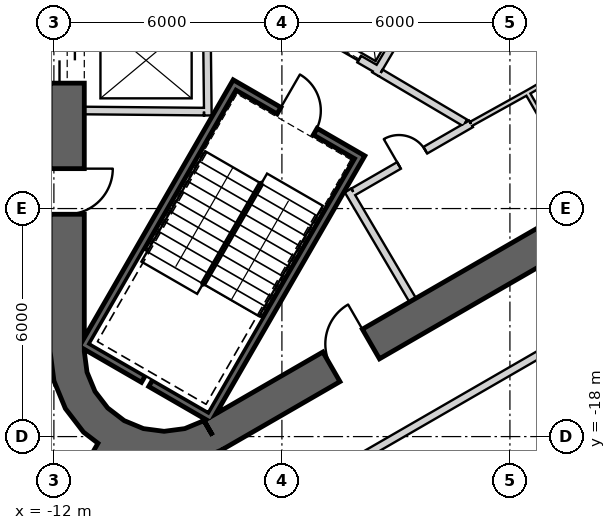
"""IFC4 building model, lengths in metres.
Left out: names, types, materials, properties, quantities, classifications, styles, units other than length and angle.
Written with IfcOpenShell. Run it as: python <this file> out.ifc"""

import sys

from ifc_helpers import new_model, si_unit, direction, frame, frame_2d, origin, place, context, subcontext, project, spatial, polyline, rectangle, outline, extrude, element, fill, save


model = new_model("IFC4")
c1 = context("Model", 3, precision=1e-05, world=origin(), true_north=direction((0.0, 1.0)))
c2 = subcontext(c1, "Body", "Model", "MODEL_VIEW")
j1 = project(units=[si_unit("LENGTHUNIT", "METRE"), si_unit("PLANEANGLEUNIT", "RADIAN")], contexts=[c1])
p1 = place(None, origin())
s1 = spatial("IfcSite", under=j1, at=p1, CompositionType="ELEMENT")
p2 = place(p1, origin())
s2 = spatial("IfcBuilding", under=s1, at=p2, CompositionType="ELEMENT")
p3 = place(p2, frame((0.0, 0.0, 380.6)))
s3 = spatial("IfcBuildingStorey", under=s2, at=p3, CompositionType="ELEMENT", Elevation=380.6)
p4 = place(p3, frame((-11.65, 15.762, 0.0), z_axis=(0.0, 0.0, 1.0), x_axis=(0.0, -1.0, 0.0)))
e1 = element("IfcWall", 1, at=p4, inside=s3, PredefinedType="SHEAR", context=c2, shape_type="SweptSolid", body=[
    extrude(rectangle(XDim=31.523, YDim=0.9, at=frame_2d((15.762, 0.0))), origin(), (0.0, 0.0, 1.0), 3.9),
])
p5 = place(p4, frame((7.062, 0.0, 0.0)))
e2 = element("IfcOpeningElement", 2, at=p5, cuts=e1, PredefinedType="OPENING", context=c2, shape_type="SweptSolid", body=[
    extrude(rectangle(XDim=1.2, YDim=2.4, at=frame_2d((0.6, 1.2))), frame((0.0, 0.46, 0.0), z_axis=(0.0, -1.0, 0.0), x_axis=(1.0, 0.0, 0.0)), (0.0, 0.0, 1.0), 0.92),
])
p6 = place(p4, frame((9.762, 0.0, 0.0)))
e3 = element("IfcOpeningElement", 3, at=p6, cuts=e1, PredefinedType="OPENING", context=c2, shape_type="SweptSolid", body=[
    extrude(rectangle(XDim=1.2, YDim=2.4, at=frame_2d((0.6, 1.2))), frame((0.0, 0.46, 0.0), z_axis=(0.0, -1.0, 0.0), x_axis=(1.0, 0.0, 0.0)), (0.0, 0.0, 1.0), 0.92),
])
p7 = place(p4, frame((12.462, 0.0, 0.0)))
e4 = element("IfcOpeningElement", 4, at=p7, cuts=e1, PredefinedType="OPENING", context=c2, shape_type="SweptSolid", body=[
    extrude(rectangle(XDim=1.2, YDim=2.4, at=frame_2d((0.6, 1.2))), frame((0.0, 0.46, 0.0), z_axis=(0.0, -1.0, 0.0), x_axis=(1.0, 0.0, 0.0)), (0.0, 0.0, 1.0), 0.92),
])
p8 = place(p4, frame((15.162, 0.0, 0.0)))
e5 = element("IfcOpeningElement", 5, at=p8, cuts=e1, PredefinedType="OPENING", context=c2, shape_type="SweptSolid", body=[
    extrude(rectangle(XDim=1.2, YDim=2.4, at=frame_2d((0.6, 1.2))), frame((0.0, 0.46, 0.0), z_axis=(0.0, -1.0, 0.0), x_axis=(1.0, 0.0, 0.0)), (0.0, 0.0, 1.0), 0.92),
])
p9 = place(p4, frame((17.862, 0.0, 0.0)))
e6 = element("IfcOpeningElement", 6, at=p9, cuts=e1, PredefinedType="OPENING", context=c2, shape_type="SweptSolid", body=[
    extrude(rectangle(XDim=1.2, YDim=2.4, at=frame_2d((0.6, 1.2))), frame((0.0, 0.46, 0.0), z_axis=(0.0, -1.0, 0.0), x_axis=(1.0, 0.0, 0.0)), (0.0, 0.0, 1.0), 0.92),
])
p10 = place(p4, frame((20.562, 0.0, 0.0)))
e7 = element("IfcOpeningElement", 7, at=p10, cuts=e1, PredefinedType="OPENING", context=c2, shape_type="SweptSolid", body=[
    extrude(rectangle(XDim=1.2, YDim=2.4, at=frame_2d((0.6, 1.2))), frame((0.0, 0.46, 0.0), z_axis=(0.0, -1.0, 0.0), x_axis=(1.0, 0.0, 0.0)), (0.0, 0.0, 1.0), 0.92),
])
p11 = place(p4, frame((23.262, 0.0, 0.0)))
e8 = element("IfcOpeningElement", 8, at=p11, cuts=e1, PredefinedType="OPENING", context=c2, shape_type="SweptSolid", body=[
    extrude(rectangle(XDim=1.2, YDim=2.4, at=frame_2d((0.6, 1.2))), frame((0.0, 0.46, 0.0), z_axis=(0.0, -1.0, 0.0), x_axis=(1.0, 0.0, 0.0)), (0.0, 0.0, 1.0), 0.92),
])
p12 = place(p4, frame((3.612, 0.0, 0.0)))
e9 = element("IfcOpeningElement", 9, at=p12, cuts=e1, PredefinedType="OPENING", context=c2, shape_type="SweptSolid", body=[
    extrude(rectangle(XDim=1.2, YDim=2.4, at=frame_2d((0.6, 1.2))), frame((0.0, 0.46, 0.0), z_axis=(0.0, -1.0, 0.0), x_axis=(1.0, 0.0, 0.0)), (0.0, 0.0, 1.0), 0.92),
])
p13 = place(p4, frame((26.712, 0.0, 0.0)))
e10 = element("IfcOpeningElement", 10, at=p13, cuts=e1, PredefinedType="OPENING", context=c2, shape_type="SweptSolid", body=[
    extrude(rectangle(XDim=1.2, YDim=2.4, at=frame_2d((0.6, 1.2))), frame((0.0, 0.46, 0.0), z_axis=(0.0, -1.0, 0.0), x_axis=(1.0, 0.0, 0.0)), (0.0, 0.0, 1.0), 0.92),
])
p14 = place(p3, frame((-7.825, -17.97, 0.0), z_axis=(0.0, 0.0, 1.0), x_axis=(0.866028369851, 0.499994862586, 0.0)))
e11 = element("IfcWall", 11, at=p14, inside=s3, PredefinedType="SHEAR", context=c2, shape_type="SweptSolid", body=[
    extrude(rectangle(XDim=31.523, YDim=0.9, at=frame_2d((15.762, 0.0))), origin(), (0.0, 0.0, 1.0), 3.9),
])
p15 = place(p14, frame((17.862, 0.0, 0.0)))
e12 = element("IfcOpeningElement", 12, at=p15, cuts=e11, PredefinedType="OPENING", context=c2, shape_type="SweptSolid", body=[
    extrude(rectangle(XDim=1.2, YDim=2.4, at=frame_2d((0.6, 1.2))), frame((0.0, 0.46, 0.0), z_axis=(0.0, -1.0, 0.0), x_axis=(1.0, 0.0, 0.0)), (0.0, 0.0, 1.0), 0.92),
])
p16 = place(p14, frame((20.562, 0.0, 0.0)))
e13 = element("IfcOpeningElement", 13, at=p16, cuts=e11, PredefinedType="OPENING", context=c2, shape_type="SweptSolid", body=[
    extrude(rectangle(XDim=1.2, YDim=2.4, at=frame_2d((0.6, 1.2))), frame((0.0, 0.46, 0.0), z_axis=(0.0, -1.0, 0.0), x_axis=(1.0, 0.0, 0.0)), (0.0, 0.0, 1.0), 0.92),
])
p17 = place(p14, frame((26.712, 0.0, 0.0)))
e14 = element("IfcOpeningElement", 14, at=p17, cuts=e11, PredefinedType="OPENING", context=c2, shape_type="SweptSolid", body=[
    extrude(rectangle(XDim=1.2, YDim=2.4, at=frame_2d((0.6, 1.2))), frame((0.0, 0.46, 0.0), z_axis=(0.0, -1.0, 0.0), x_axis=(1.0, 0.0, 0.0)), (0.0, 0.0, 1.0), 0.92),
])
p18 = place(p14, frame((3.612, 0.0, 0.0)))
e15 = element("IfcOpeningElement", 15, at=p18, cuts=e11, PredefinedType="OPENING", context=c2, shape_type="SweptSolid", body=[
    extrude(rectangle(XDim=1.2, YDim=2.4, at=frame_2d((0.6, 1.2))), frame((0.0, 0.46, 0.0), z_axis=(0.0, -1.0, 0.0), x_axis=(1.0, 0.0, 0.0)), (0.0, 0.0, 1.0), 0.92),
])
p19 = place(p3, origin())
e16 = element("IfcWall", 16, at=p19, inside=s3, PredefinedType="SHEAR", context=c2, shape_type="SweptSolid", body=[
    extrude(outline(polyline([(-12.1, -15.762), (-11.998, -16.538), (-11.698, -17.262), (-11.221, -17.883), (-10.6, -18.36), (-9.876, -18.659), (-9.1, -18.762), (-8.323, -18.659), (-7.6, -18.36), (-8.05, -17.58), (-8.556, -17.79), (-9.1, -17.862), (-9.644, -17.79), (-10.15, -17.58), (-10.585, -17.247), (-10.919, -16.812), (-11.128, -16.305), (-11.2, -15.762), (-12.1, -15.762)])), origin(), (0.0, 0.0, 1.0), 3.9),
])
p20 = place(p3, frame((-10.575, -18.316, 0.0), z_axis=(0.0, 0.0, 1.0), x_axis=(-0.500011655475, -0.866018674388, 0.0)))
e17 = element("IfcWall", 17, at=p20, inside=s3, PredefinedType="SHEAR", context=c2, shape_type="SweptSolid", body=[
    extrude(rectangle(XDim=6.455, YDim=0.6, at=frame_2d((3.228, 0.0))), origin(), (0.0, 0.0, 1.0), 3.9),
])
p21 = place(p20, frame((2.35, 0.0, 0.0)))
e18 = element("IfcOpeningElement", 18, at=p21, cuts=e17, PredefinedType="OPENING", context=c2, shape_type="SweptSolid", body=[
    extrude(rectangle(XDim=1.4, YDim=2.4, at=frame_2d((0.7, 1.2))), frame((0.0, 0.31, 0.0), z_axis=(0.0, -1.0, 0.0), x_axis=(1.0, 0.0, 0.0)), (0.0, 0.0, 1.0), 0.62),
])
p22 = place(p3, frame((-7.979, -6.85, 0.0), z_axis=(0.0, 0.0, 1.0), x_axis=(0.011121475088, -0.999938154483, 0.0)))
e19 = element("IfcWall", 19, at=p22, inside=s3, PredefinedType="PLUMBINGWALL", context=c2, shape_type="SweptSolid", body=[
    extrude(rectangle(XDim=2.7, YDim=0.2, at=frame_2d((1.35, 0.0))), origin(), (0.0, 0.0, 1.0), 3.6),
])
p23 = place(p3, frame((-8.05, -9.449, 0.0), z_axis=(0.0, 0.0, 1.0), x_axis=(-0.999957467379, 0.009222983926, 0.0)))
e20 = element("IfcWall", 20, at=p23, inside=s3, PredefinedType="PLUMBINGWALL", context=c2, shape_type="SweptSolid", body=[
    extrude(rectangle(XDim=3.15, YDim=0.2, at=frame_2d((1.575, 0.0))), origin(), (0.0, 0.0, 1.0), 3.6),
])
p24 = place(p3, frame((-3.905, -10.563, -0.3), z_axis=(0.0, 0.0, 1.0), x_axis=(-0.500012932018, -0.866017937352, 0.0)))
e21 = element("IfcWall", 21, at=p24, inside=s3, PredefinedType="SHEAR", context=c2, shape_type="SweptSolid", body=[
    extrude(rectangle(XDim=8.1, YDim=0.2, at=frame_2d((4.05, 0.0))), origin(), (0.0, 0.0, 1.0), 3.9),
])
p25 = place(p3, frame((-11.282, -15.541, -0.3), z_axis=(0.0, 0.0, 1.0), x_axis=(0.866000578957, -0.500042995397, 0.0)))
e22 = element("IfcWall", 22, at=p25, inside=s3, PredefinedType="SHEAR", context=c2, shape_type="SweptSolid", body=[
    extrude(rectangle(XDim=1.89, YDim=0.2, at=frame_2d((0.945, 0.0))), origin(), (0.0, 0.0, 1.0), 3.9),
])
p26 = place(p3, frame((-9.455, -16.596, -0.3), z_axis=(0.0, 0.0, 1.0), x_axis=(0.866038843867, -0.499976720371, 0.0)))
e23 = element("IfcWall", 23, at=p26, inside=s3, PredefinedType="SHEAR", context=c2, shape_type="SweptSolid", body=[
    extrude(rectangle(XDim=1.69, YDim=0.2, at=frame_2d((0.845, 0.0))), origin(), (0.0, 0.0, 1.0), 3.9),
])
p27 = place(p3, frame((-7.196, -8.663, -0.3), z_axis=(0.0, 0.0, 1.0), x_axis=(-0.499997992926, -0.866026562566, 0.0)))
e24 = element("IfcWall", 24, at=p27, inside=s3, PredefinedType="SHEAR", context=c2, shape_type="SweptSolid", body=[
    extrude(rectangle(XDim=7.9, YDim=0.2, at=frame_2d((3.95, 0.0))), origin(), (0.0, 0.0, 1.0), 3.9),
])
p28 = place(p3, frame((-4.041, -10.599, -0.3), z_axis=(0.0, 0.0, 1.0), x_axis=(-0.866047807691, 0.499961193289, 0.0)))
e25 = element("IfcWall", 25, at=p28, inside=s3, PredefinedType="SHEAR", context=c2, shape_type="SweptSolid", body=[
    extrude(rectangle(XDim=3.6, YDim=0.2, at=frame_2d((1.8, 0.0))), origin(), (0.0, 0.0, 1.0), 3.9),
])
p29 = place(p28, frame((1.25, 0.0, 0.3)))
e26 = element("IfcOpeningElement", 26, at=p29, cuts=e25, PredefinedType="OPENING", context=c2, shape_type="SweptSolid", body=[
    extrude(rectangle(XDim=1.1, YDim=2.1, at=frame_2d((0.55, 1.05))), frame((0.0, 0.11, 0.0), z_axis=(0.0, -1.0, 0.0), x_axis=(1.0, 0.0, 0.0)), (0.0, 0.0, 1.0), 0.22),
])
p30 = place(p3, frame((-3.446, -8.368, 0.0), z_axis=(0.0, 0.0, 1.0), x_axis=(-0.866024647952, 0.500001309137, 0.0)))
e27 = element("IfcWall", 27, at=p30, inside=s3, PredefinedType="PLUMBINGWALL", context=c2, shape_type="SweptSolid", body=[
    extrude(rectangle(XDim=2.4, YDim=0.2, at=frame_2d((1.2, 0.0))), origin(), (0.0, 0.0, 1.0), 3.6),
])
p31 = place(p30, frame((0.6, 0.0, 0.0)))
e28 = element("IfcOpeningElement", 28, at=p31, cuts=e27, PredefinedType="OPENING", context=c2, shape_type="SweptSolid", body=[
    extrude(rectangle(XDim=1.2, YDim=2.4, at=frame_2d((0.6, 1.2))), frame((0.0, 0.11, 0.0), z_axis=(0.0, -1.0, 0.0), x_axis=(1.0, 0.0, 0.0)), (0.0, 0.0, 1.0), 0.22),
])
p32 = place(p3, frame((-2.012, -5.882, 0.0), z_axis=(0.0, 0.0, 1.0), x_axis=(-0.508619639323, -0.860991325447, 0.0)))
e29 = element("IfcWall", 29, at=p32, inside=s3, PredefinedType="PLUMBINGWALL", context=c2, shape_type="SweptSolid", body=[
    extrude(rectangle(XDim=3.0, YDim=0.2, at=frame_2d((1.5, 0.0))), origin(), (0.0, 0.0, 1.0), 3.6),
])
p33 = place(p3, frame((-1.897, -10.275, 0.0), z_axis=(0.0, 0.0, 1.0), x_axis=(0.499984717929, -0.866034226713, 0.0)))
e30 = element("IfcWall", 30, at=p33, inside=s3, PredefinedType="PARTITIONING", context=c2, shape_type="SweptSolid", body=[
    extrude(rectangle(XDim=3.25, YDim=0.12, at=frame_2d((1.625, 0.0))), origin(), (0.0, 0.0, 1.0), 3.6),
])
p34 = place(p3, frame((-4.26, -11.524, 0.0), z_axis=(0.0, 0.0, 1.0), x_axis=(0.507997497166, -0.861358544901, 0.0)))
e31 = element("IfcWall", 31, at=p34, inside=s3, PredefinedType="PARTITIONING", context=c2, shape_type="SweptSolid", body=[
    extrude(rectangle(XDim=3.35, YDim=0.2, at=frame_2d((1.675, 0.0))), origin(), (0.0, 0.0, 1.0), 3.6),
])
p35 = place(p34, frame((1.325, 0.0, 0.0)))
e32 = element("IfcOpeningElement", 32, at=p35, cuts=e31, PredefinedType="OPENING", context=c2, shape_type="SweptSolid", body=[
    extrude(rectangle(XDim=0.8, YDim=2.1, at=frame_2d((0.4, 1.05))), frame((0.0, 0.11, 0.0), z_axis=(0.0, -1.0, 0.0), x_axis=(1.0, 0.0, 0.0)), (0.0, 0.0, 1.0), 0.22),
])
p36 = place(p3, frame((-1.769, -10.237, 0.0), z_axis=(0.0, 0.0, 1.0), x_axis=(-0.871534483978, -0.490334215854, 0.0)))
e33 = element("IfcWall", 33, at=p36, inside=s3, PredefinedType="PARTITIONING", context=c2, shape_type="SweptSolid", body=[
    extrude(rectangle(XDim=2.7, YDim=0.2, at=frame_2d((1.35, 0.0))), origin(), (0.0, 0.0, 1.0), 3.6),
])
p37 = place(p3, frame((-1.024, -9.771, 0.0), z_axis=(0.0, 0.0, 1.0), x_axis=(-0.850348075135, -0.526220629693, 0.0)))
e34 = element("IfcWall", 34, at=p37, inside=s3, PredefinedType="PARTITIONING", context=c2, shape_type="SweptSolid", body=[
    extrude(rectangle(XDim=0.878, YDim=0.2, at=frame_2d((0.439, 0.0))), origin(), (0.0, 0.0, 1.0), 3.6),
])
p38 = place(p3, frame((0.42, -8.938, 0.0), z_axis=(0.0, 0.0, 1.0), x_axis=(0.871409832999, 0.490555708306, 0.0)))
e35 = element("IfcWall", 35, at=p38, inside=s3, PredefinedType="PLUMBINGWALL", context=c2, shape_type="SweptSolid", body=[
    extrude(rectangle(XDim=2.755, YDim=0.15, at=frame_2d((1.377, 0.0))), origin(), (0.0, 0.0, 1.0), 3.6),
])
p39 = place(p3, frame((0.4, -8.949, 0.0), z_axis=(0.0, 0.0, 1.0), x_axis=(-0.866019818373, -0.500009674092, 0.0)))
e36 = element("IfcWall", 36, at=p39, inside=s3, PredefinedType="PARTITIONING", context=c2, shape_type="SweptSolid", body=[
    extrude(rectangle(XDim=1.594, YDim=0.12, at=frame_2d((0.797, 0.0))), origin(), (0.0, 0.0, 1.0), 3.6),
])
p40 = place(p39, frame((0.397, 0.0, 0.0)))
e37 = element("IfcOpeningElement", 37, at=p40, cuts=e36, PredefinedType="OPENING", context=c2, shape_type="SweptSolid", body=[
    extrude(rectangle(XDim=0.8, YDim=2.1, at=frame_2d((0.4, 1.05))), frame((0.0, 0.07, 0.0), z_axis=(0.0, -1.0, 0.0), x_axis=(1.0, 0.0, 0.0)), (0.0, 0.0, 1.0), 0.14),
])
p41 = place(p3, frame((-3.401, -8.43, 0.0), z_axis=(0.0, 0.0, 1.0), x_axis=(0.860617791406, -0.509251428192, 0.0)))
e38 = element("IfcWall", 38, at=p41, inside=s3, PredefinedType="PARTITIONING", context=c2, shape_type="SweptSolid", body=[
    extrude(rectangle(XDim=2.709, YDim=0.2, at=frame_2d((1.354, 0.0))), origin(), (0.0, 0.0, 1.0), 3.6),
])
p42 = place(p41, frame((0.848, 0.0, 0.0)))
e39 = element("IfcOpeningElement", 39, at=p42, cuts=e38, PredefinedType="OPENING", context=c2, shape_type="SweptSolid", body=[
    extrude(rectangle(XDim=1.0, YDim=2.1, at=frame_2d((0.5, 1.05))), frame((0.0, 0.11, 0.0), z_axis=(0.0, -1.0, 0.0), x_axis=(1.0, 0.0, 0.0)), (0.0, 0.0, 1.0), 0.22),
])
p43 = place(p3, frame((-1.477, -7.808, 0.0), z_axis=(0.0, 0.0, 1.0), x_axis=(0.871829948107, -0.48980867855, 0.0)))
e40 = element("IfcWall", 40, at=p43, inside=s3, PredefinedType="PLUMBINGWALL", context=c2, shape_type="SweptSolid", body=[
    extrude(rectangle(XDim=2.152, YDim=0.15, at=frame_2d((1.076, 0.0))), origin(), (0.0, 0.0, 1.0), 3.6),
])
p44 = place(p3, frame((-7.061, -20.358, 0.0), z_axis=(0.0, 0.0, 1.0), x_axis=(0.866024332115, 0.500001856182, 0.0)))
e41 = element("IfcWall", 41, at=p44, inside=s3, PredefinedType="PARTITIONING", context=c2, shape_type="SweptSolid", body=[
    extrude(rectangle(XDim=8.925, YDim=0.2, at=frame_2d((4.463, 0.0))), origin(), (0.0, 0.0, 1.0), 2.97),
])
p45 = place(p44, frame((4.1, 0.0, 0.0)))
e42 = element("IfcOpeningElement", 42, at=p45, cuts=e41, PredefinedType="OPENING", context=c2, shape_type="SweptSolid", body=[
    extrude(rectangle(XDim=1.0, YDim=2.1, at=frame_2d((0.5, 1.05))), frame((0.0, 0.11, 0.0), z_axis=(0.0, -1.0, 0.0), x_axis=(1.0, 0.0, 0.0)), (0.0, 0.0, 1.0), 0.22),
])
p46 = place(p3, frame((0.669, -15.895, 0.0), z_axis=(0.0, 0.0, 1.0), x_axis=(0.866018980909, 0.500011124582, 0.0)))
e43 = element("IfcWall", 43, at=p46, inside=s3, PredefinedType="PARTITIONING", context=c2, shape_type="SweptSolid", body=[
    extrude(rectangle(XDim=6.808, YDim=0.2, at=frame_2d((3.404, 0.0))), origin(), (0.0, 0.0, 1.0), 3.07),
])
p47 = place(p46, frame((3.056, 0.0, 0.0)))
e44 = element("IfcOpeningElement", 44, at=p47, cuts=e43, PredefinedType="OPENING", context=c2, shape_type="SweptSolid", body=[
    extrude(rectangle(XDim=1.0, YDim=2.1, at=frame_2d((0.5, 1.05))), frame((0.0, 0.11, 0.0), z_axis=(0.0, -1.0, 0.0), x_axis=(1.0, 0.0, 0.0)), (0.0, 0.0, 1.0), 0.22),
])
p48 = place(p3, frame((4.688, -21.709, 0.0), z_axis=(0.0, 0.0, 1.0), x_axis=(-0.565900898816, 0.824473269864, 0.0)))
e45 = element("IfcWall", 45, at=p48, inside=s3, PredefinedType="PARTITIONING", context=c2, shape_type="SweptSolid", body=[
    extrude(rectangle(XDim=6.965, YDim=0.2, at=frame_2d((3.483, 0.0))), origin(), (0.0, 0.0, 1.0), 3.07),
])
p49 = place(p29, origin())
e46 = element("IfcDoor", 46, at=p49, inside=s3, OperationType="SINGLE_SWING_RIGHT", PredefinedType="USERDEFINED", context=c2, shape_type="SweptSolid", body=[
    extrude(rectangle(XDim=1.1, YDim=2.1, at=frame_2d((0.55, 1.05))), frame((0.0, 0.025, 0.0), z_axis=(0.0, -1.0, 0.0), x_axis=(1.0, 0.0, 0.0)), (0.0, 0.0, 1.0), 0.05),
])
fill(e26, e46)
p50 = place(p42, origin())
e47 = element("IfcDoor", 47, at=p50, inside=s3, OperationType="SINGLE_SWING_RIGHT", PredefinedType="USERDEFINED", context=c2, shape_type="SweptSolid", body=[
    extrude(rectangle(XDim=1.0, YDim=2.1, at=frame_2d((0.5, 1.05))), frame((0.0, 0.025, 0.0), z_axis=(0.0, -1.0, 0.0), x_axis=(1.0, 0.0, 0.0)), (0.0, 0.0, 1.0), 0.05),
])
fill(e39, e47)
p51 = place(p31, origin())
e48 = element("IfcDoor", 48, at=p51, inside=s3, OperationType="SLIDING_TO_LEFT", PredefinedType="USERDEFINED", context=c2, shape_type="SweptSolid", body=[
    extrude(rectangle(XDim=1.2, YDim=2.4, at=frame_2d((0.6, 1.2))), frame((0.0, 0.025, 0.0), z_axis=(0.0, -1.0, 0.0), x_axis=(1.0, 0.0, 0.0)), (0.0, 0.0, 1.0), 0.05),
])
fill(e28, e48)
p52 = place(p35, origin())
e49 = element("IfcDoor", 49, at=p52, inside=s3, OperationType="SINGLE_SWING_LEFT", PredefinedType="USERDEFINED", context=c2, shape_type="SweptSolid", body=[
    extrude(rectangle(XDim=0.8, YDim=2.1, at=frame_2d((0.4, 1.05))), frame((0.0, 0.025, 0.0), z_axis=(0.0, -1.0, 0.0), x_axis=(1.0, 0.0, 0.0)), (0.0, 0.0, 1.0), 0.05),
])
fill(e32, e49)
p53 = place(p40, origin())
e50 = element("IfcDoor", 50, at=p53, inside=s3, OperationType="SINGLE_SWING_RIGHT", PredefinedType="USERDEFINED", context=c2, shape_type="SweptSolid", body=[
    extrude(rectangle(XDim=0.8, YDim=2.1, at=frame_2d((0.4, 1.05))), frame((0.0, 0.025, 0.0), z_axis=(0.0, -1.0, 0.0), x_axis=(1.0, 0.0, 0.0)), (0.0, 0.0, 1.0), 0.05),
])
fill(e37, e50)
p54 = place(p45, origin())
e51 = element("IfcDoor", 51, at=p54, inside=s3, OperationType="SINGLE_SWING_RIGHT", PredefinedType="USERDEFINED", context=c2, shape_type="SweptSolid", body=[
    extrude(rectangle(XDim=1.0, YDim=2.1, at=frame_2d((0.5, 1.05))), frame((0.0, 0.025, 0.0), z_axis=(0.0, -1.0, 0.0), x_axis=(1.0, 0.0, 0.0)), (0.0, 0.0, 1.0), 0.05),
])
fill(e42, e51)
p55 = place(p11, origin())
e52 = element("IfcDoor", 52, at=p55, inside=s3, OperationType="SLIDING_TO_LEFT", PredefinedType="USERDEFINED", context=c2, shape_type="SweptSolid", body=[
    extrude(rectangle(XDim=1.2, YDim=2.4, at=frame_2d((0.6, 1.2))), frame((0.0, 0.025, 0.0), z_axis=(0.0, -1.0, 0.0), x_axis=(1.0, 0.0, 0.0)), (0.0, 0.0, 1.0), 0.05),
])
fill(e8, e52)
p56 = place(p13, origin())
e53 = element("IfcDoor", 53, at=p56, inside=s3, OperationType="SINGLE_SWING_LEFT", PredefinedType="USERDEFINED", context=c2, shape_type="SweptSolid", body=[
    extrude(rectangle(XDim=1.2, YDim=2.4, at=frame_2d((0.6, 1.2))), frame((0.0, 0.025, 0.0), z_axis=(0.0, -1.0, 0.0), x_axis=(1.0, 0.0, 0.0)), (0.0, 0.0, 1.0), 0.05),
])
fill(e10, e53)
p57 = place(p18, origin())
e54 = element("IfcDoor", 54, at=p57, inside=s3, OperationType="SINGLE_SWING_RIGHT", PredefinedType="USERDEFINED", context=c2, shape_type="SweptSolid", body=[
    extrude(rectangle(XDim=1.2, YDim=2.4, at=frame_2d((0.6, 1.2))), frame((0.0, 0.025, 0.0), z_axis=(0.0, -1.0, 0.0), x_axis=(1.0, 0.0, 0.0)), (0.0, 0.0, 1.0), 0.05),
])
fill(e15, e54)
save(model, sys.argv[1])
